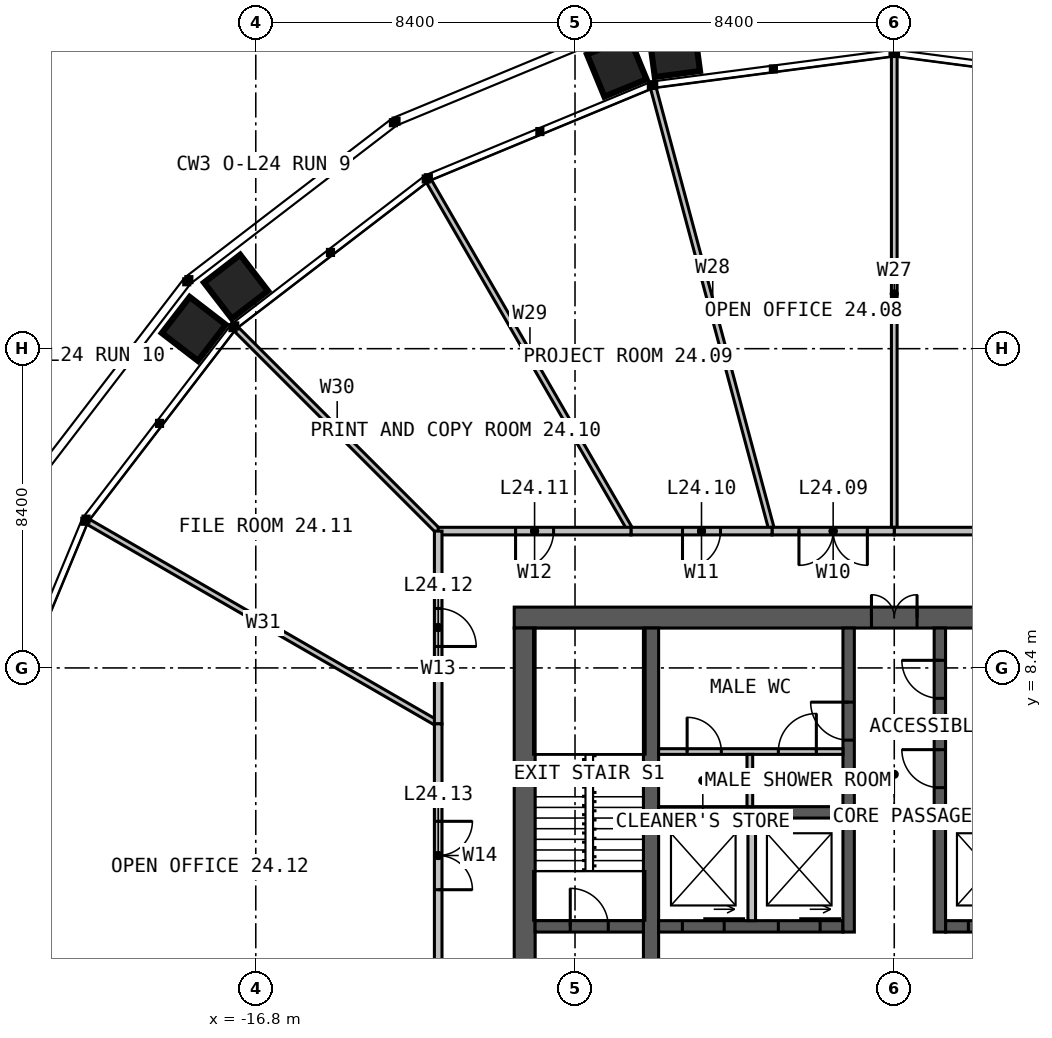
"""IFC4 building model, lengths in metres.
Left out: names, types, materials, properties, quantities, classifications, styles, units other than length and angle.
Written with IfcOpenShell. Run it as: python <this file> out.ifc"""

import sys

from ifc_helpers import new_model, si_unit, direction, frame, frame_2d, origin, place, context, subcontext, project, spatial, rectangle, extrude, element, fill, save


model = new_model("IFC4")
c1 = context("Model", 3, precision=1e-05, world=origin(), true_north=direction((0.0, 1.0)))
c2 = subcontext(c1, "Body", "Model", "MODEL_VIEW")
j1 = project(units=[si_unit("LENGTHUNIT", "METRE"), si_unit("PLANEANGLEUNIT", "RADIAN")], contexts=[c1])
p1 = place(None, origin())
s1 = spatial("IfcSite", under=j1, at=p1, CompositionType="ELEMENT")
p2 = place(p1, origin())
s2 = spatial("IfcBuilding", under=s1, at=p2, CompositionType="ELEMENT")
p3 = place(p2, frame((0.0, 0.0, 102.0)))
s3 = spatial("IfcBuildingStorey", under=s2, at=p3, CompositionType="ELEMENT", Elevation=102.0)
p4 = place(p3, frame((-10.0, 9.725, 0.0), z_axis=(0.0, 0.0, 1.0), x_axis=(1.0, 0.0, 0.0)))
e1 = element("IfcWall", 1, at=p4, inside=s3, PredefinedType="SOLIDWALL", context=c2, shape_type="SweptSolid", body=[
    extrude(rectangle(XDim=20.0, YDim=0.55, at=frame_2d((10.0, 0.0))), origin(), (0.0, 0.0, 1.0), 4.0),
])
p5 = place(p4, frame((9.4, 0.0, 0.0)))
e2 = element("IfcOpeningElement", 2, at=p5, cuts=e1, PredefinedType="OPENING", context=c2, shape_type="SweptSolid", body=[
    extrude(rectangle(XDim=1.2, YDim=2.2, at=frame_2d((0.6, 1.1))), frame((0.0, 0.285, 0.0), z_axis=(0.0, -1.0, 0.0), x_axis=(1.0, 0.0, 0.0)), (0.0, 0.0, 1.0), 0.57),
])
p6 = place(p3, frame((-9.725, 9.45, 0.0), z_axis=(0.0, 0.0, 1.0), x_axis=(0.0, -1.0, 0.0)))
e3 = element("IfcWall", 3, at=p6, inside=s3, PredefinedType="SOLIDWALL", context=c2, shape_type="SweptSolid", body=[
    extrude(rectangle(XDim=18.9, YDim=0.55, at=frame_2d((9.45, 0.0))), origin(), (0.0, 0.0, 1.0), 4.0),
])
p7 = place(p3, frame((-6.4, -9.45, 0.0), z_axis=(0.0, 0.0, 1.0), x_axis=(0.0, 1.0, 0.0)))
e4 = element("IfcWall", 4, at=p7, inside=s3, PredefinedType="SOLIDWALL", context=c2, shape_type="SweptSolid", body=[
    extrude(rectangle(XDim=18.9, YDim=0.4, at=frame_2d((9.45, 0.0))), origin(), (0.0, 0.0, 1.0), 4.0),
])
p8 = place(p7, frame((8.95, 0.0, 0.0)))
e5 = element("IfcOpeningElement", 5, at=p8, cuts=e4, PredefinedType="OPENING", context=c2, shape_type="SweptSolid", body=[
    extrude(rectangle(XDim=1.0, YDim=2.2, at=frame_2d((0.5, 1.1))), frame((0.0, 0.21, 0.0), z_axis=(0.0, -1.0, 0.0), x_axis=(1.0, 0.0, 0.0)), (0.0, 0.0, 1.0), 0.42),
])
p9 = place(p3, frame((-6.2, 1.6, 0.0), z_axis=(0.0, 0.0, 1.0), x_axis=(1.0, 0.0, 0.0)))
e6 = element("IfcWall", 6, at=p9, inside=s3, PredefinedType="SOLIDWALL", context=c2, shape_type="SweptSolid", body=[
    extrude(rectangle(XDim=4.85, YDim=0.3, at=frame_2d((2.425, 0.0))), origin(), (0.0, 0.0, 1.0), 4.0),
])
p10 = place(p9, frame((0.625, 0.0, 0.0)))
e7 = element("IfcOpeningElement", 7, at=p10, cuts=e6, PredefinedType="OPENING", context=c2, shape_type="SweptSolid", body=[
    extrude(rectangle(XDim=1.1, YDim=2.2, at=frame_2d((0.55, 1.1))), frame((0.0, 0.16, 0.0), z_axis=(0.0, -1.0, 0.0), x_axis=(1.0, 0.0, 0.0)), (0.0, 0.0, 1.0), 0.32),
])
p11 = place(p9, frame((3.15, 0.0, 0.0)))
e8 = element("IfcOpeningElement", 8, at=p11, cuts=e6, PredefinedType="OPENING", context=c2, shape_type="SweptSolid", body=[
    extrude(rectangle(XDim=1.1, YDim=2.2, at=frame_2d((0.55, 1.1))), frame((0.0, 0.16, 0.0), z_axis=(0.0, -1.0, 0.0), x_axis=(1.0, 0.0, 0.0)), (0.0, 0.0, 1.0), 0.32),
])
p12 = place(p3, frame((1.35, 1.6, 0.0), z_axis=(0.0, 0.0, 1.0), x_axis=(1.0, 0.0, 0.0)))
e9 = element("IfcWall", 9, at=p12, inside=s3, PredefinedType="SOLIDWALL", context=c2, shape_type="SweptSolid", body=[
    extrude(rectangle(XDim=4.85, YDim=0.3, at=frame_2d((2.425, 0.0))), origin(), (0.0, 0.0, 1.0), 4.0),
])
p13 = place(p12, frame((0.6, 0.0, 0.0)))
e10 = element("IfcOpeningElement", 10, at=p13, cuts=e9, PredefinedType="OPENING", context=c2, shape_type="SweptSolid", body=[
    extrude(rectangle(XDim=1.1, YDim=2.2, at=frame_2d((0.55, 1.1))), frame((0.0, 0.16, 0.0), z_axis=(0.0, -1.0, 0.0), x_axis=(1.0, 0.0, 0.0)), (0.0, 0.0, 1.0), 0.32),
])
p14 = place(p12, frame((3.125, 0.0, 0.0)))
e11 = element("IfcOpeningElement", 11, at=p14, cuts=e9, PredefinedType="OPENING", context=c2, shape_type="SweptSolid", body=[
    extrude(rectangle(XDim=1.1, YDim=2.2, at=frame_2d((0.55, 1.1))), frame((0.0, 0.16, 0.0), z_axis=(0.0, -1.0, 0.0), x_axis=(1.0, 0.0, 0.0)), (0.0, 0.0, 1.0), 0.32),
])
for number, where, z_axis, x_axis in (
    (12, (-6.2, 4.6, 0.0), (0.0, 0.0, 1.0), (1.0, 0.0, 0.0)),
    (13, (1.35, 4.6, 0.0), (0.0, 0.0, 1.0), (1.0, 0.0, 0.0)),
):
    element("IfcWall", number, at=place(p3, frame(where, z_axis=z_axis, x_axis=x_axis)), inside=s3, PredefinedType="SOLIDWALL", context=c2, shape_type="SweptSolid", body=[
        extrude(rectangle(XDim=4.85, YDim=0.3, at=frame_2d((2.425, 0.0))), origin(), (0.0, 0.0, 1.0), 4.0),
    ])
p15 = place(p3, frame((-1.2, 1.45, 0.0), z_axis=(0.0, 0.0, 1.0), x_axis=(0.0, 1.0, 0.0)))
e14 = element("IfcWall", 14, at=p15, inside=s3, PredefinedType="SOLIDWALL", context=c2, shape_type="SweptSolid", body=[
    extrude(rectangle(XDim=8.0, YDim=0.3, at=frame_2d((4.0, 0.0))), origin(), (0.0, 0.0, 1.0), 4.0),
])
p16 = place(p15, frame((5.05, 0.0, 0.0)))
e15 = element("IfcOpeningElement", 15, at=p16, cuts=e14, PredefinedType="OPENING", context=c2, shape_type="SweptSolid", body=[
    extrude(rectangle(XDim=1.0, YDim=2.2, at=frame_2d((0.5, 1.1))), frame((0.0, 0.16, 0.0), z_axis=(0.0, -1.0, 0.0), x_axis=(1.0, 0.0, 0.0)), (0.0, 0.0, 1.0), 0.32),
])
p17 = place(p3, frame((1.2, 1.45, 0.0), z_axis=(0.0, 0.0, 1.0), x_axis=(0.0, 1.0, 0.0)))
e16 = element("IfcWall", 16, at=p17, inside=s3, PredefinedType="SOLIDWALL", context=c2, shape_type="SweptSolid", body=[
    extrude(rectangle(XDim=8.0, YDim=0.3, at=frame_2d((4.0, 0.0))), origin(), (0.0, 0.0, 1.0), 4.0),
])
p18 = place(p17, frame((3.8, 0.0, 0.0)))
e17 = element("IfcOpeningElement", 17, at=p18, cuts=e16, PredefinedType="OPENING", context=c2, shape_type="SweptSolid", body=[
    extrude(rectangle(XDim=1.0, YDim=2.2, at=frame_2d((0.5, 1.1))), frame((0.0, 0.16, 0.0), z_axis=(0.0, -1.0, 0.0), x_axis=(1.0, 0.0, 0.0)), (0.0, 0.0, 1.0), 0.32),
])
p19 = place(p17, frame((6.15, 0.0, 0.0)))
e18 = element("IfcOpeningElement", 18, at=p19, cuts=e16, PredefinedType="OPENING", context=c2, shape_type="SweptSolid", body=[
    extrude(rectangle(XDim=1.0, YDim=2.2, at=frame_2d((0.5, 1.1))), frame((0.0, 0.16, 0.0), z_axis=(0.0, -1.0, 0.0), x_axis=(1.0, 0.0, 0.0)), (0.0, 0.0, 1.0), 0.32),
])
p20 = place(p3, frame((-9.45, 1.6, 0.0), z_axis=(0.0, 0.0, 1.0), x_axis=(1.0, 0.0, 0.0)))
e19 = element("IfcWall", 19, at=p20, inside=s3, PredefinedType="SOLIDWALL", context=c2, shape_type="SweptSolid", body=[
    extrude(rectangle(XDim=2.85, YDim=0.3, at=frame_2d((1.425, 0.0))), origin(), (0.0, 0.0, 1.0), 4.0),
])
p21 = place(p20, frame((0.925, 0.0, 0.0)))
e20 = element("IfcOpeningElement", 20, at=p21, cuts=e19, PredefinedType="OPENING", context=c2, shape_type="SweptSolid", body=[
    extrude(rectangle(XDim=1.0, YDim=2.2, at=frame_2d((0.5, 1.1))), frame((0.0, 0.16, 0.0), z_axis=(0.0, -1.0, 0.0), x_axis=(1.0, 0.0, 0.0)), (0.0, 0.0, 1.0), 0.32),
])
p22 = place(p3, frame((-3.75, 1.75, 0.0), z_axis=(0.0, 0.0, 1.0), x_axis=(0.0, 1.0, 0.0)))
e21 = element("IfcWall", 21, at=p22, inside=s3, PredefinedType="SOLIDWALL", context=c2, shape_type="SweptSolid", body=[
    extrude(rectangle(XDim=2.7, YDim=0.2, at=frame_2d((1.35, 0.0))), origin(), (0.0, 0.0, 1.0), 3.75),
])
p23 = place(p3, frame((1.35, 6.8, 0.0), z_axis=(0.0, 0.0, 1.0), x_axis=(1.0, 0.0, 0.0)))
e22 = element("IfcWall", 22, at=p23, inside=s3, PredefinedType="PARTITIONING", context=c2, shape_type="SweptSolid", body=[
    extrude(rectangle(XDim=4.85, YDim=0.15, at=frame_2d((2.425, 0.0))), origin(), (0.0, 0.0, 1.0), 3.75),
])
p24 = place(p3, frame((-6.2, 6.2, 0.0), z_axis=(0.0, 0.0, 1.0), x_axis=(1.0, 0.0, 0.0)))
e23 = element("IfcWall", 23, at=p24, inside=s3, PredefinedType="PARTITIONING", context=c2, shape_type="SweptSolid", body=[
    extrude(rectangle(XDim=4.85, YDim=0.15, at=frame_2d((2.425, 0.0))), origin(), (0.0, 0.0, 1.0), 3.75),
])
p25 = place(p24, frame((3.15, 0.0, 0.0)))
e24 = element("IfcOpeningElement", 24, at=p25, cuts=e23, PredefinedType="OPENING", context=c2, shape_type="SweptSolid", body=[
    extrude(rectangle(XDim=1.0, YDim=2.2, at=frame_2d((0.5, 1.1))), frame((0.0, 0.085, 0.0), z_axis=(0.0, -1.0, 0.0), x_axis=(1.0, 0.0, 0.0)), (0.0, 0.0, 1.0), 0.17),
])
p26 = place(p24, frame((0.75, 0.0, 0.0)))
e25 = element("IfcOpeningElement", 25, at=p26, cuts=e23, PredefinedType="OPENING", context=c2, shape_type="SweptSolid", body=[
    extrude(rectangle(XDim=0.9, YDim=2.2, at=frame_2d((0.45, 1.1))), frame((0.0, 0.085, 0.0), z_axis=(0.0, -1.0, 0.0), x_axis=(1.0, 0.0, 0.0)), (0.0, 0.0, 1.0), 0.17),
])
p27 = place(p3, frame((-3.8, 4.75, 0.0), z_axis=(0.0, 0.0, 1.0), x_axis=(0.0, 1.0, 0.0)))
e26 = element("IfcWall", 26, at=p27, inside=s3, PredefinedType="PARTITIONING", context=c2, shape_type="SweptSolid", body=[
    extrude(rectangle(XDim=1.375, YDim=0.15, at=frame_2d((0.688, 0.0))), origin(), (0.0, 0.0, 1.0), 3.75),
])
p28 = place(p3, frame((0.0, 12.0, 0.0), z_axis=(0.0, 0.0, 1.0), x_axis=(0.0, 1.0, 0.0)))
e27 = element("IfcWall", 27, at=p28, inside=s3, PredefinedType="PARTITIONING", context=c2, shape_type="SweptSolid", body=[
    extrude(rectangle(XDim=12.487, YDim=0.15, at=frame_2d((6.244, 0.0))), origin(), (0.0, 0.0, 1.0), 2.79),
])
p29 = place(p3, frame((-3.215, 12.0, 0.0), z_axis=(0.0, 0.0, 1.0), x_axis=(-0.258814986396, 0.965926913807, 0.0)))
e28 = element("IfcWall", 28, at=p29, inside=s3, PredefinedType="PARTITIONING", context=c2, shape_type="SweptSolid", body=[
    extrude(rectangle(XDim=12.064, YDim=0.15, at=frame_2d((6.032, 0.0))), origin(), (0.0, 0.0, 1.0), 2.79),
])
p30 = place(p3, frame((-6.928, 12.0, 0.0), z_axis=(0.0, 0.0, 1.0), x_axis=(-0.500002090115, 0.866024197053, 0.0)))
e29 = element("IfcWall", 29, at=p30, inside=s3, PredefinedType="PARTITIONING", context=c2, shape_type="SweptSolid", body=[
    extrude(rectangle(XDim=10.631, YDim=0.15, at=frame_2d((5.315, 0.0))), origin(), (0.0, 0.0, 1.0), 2.79),
])
p31 = place(p3, frame((-12.0, 12.0, 0.0), z_axis=(0.0, 0.0, 1.0), x_axis=(-0.707106781187, 0.707106781187, 0.0)))
e30 = element("IfcWall", 30, at=p31, inside=s3, PredefinedType="PARTITIONING", context=c2, shape_type="SweptSolid", body=[
    extrude(rectangle(XDim=7.517, YDim=0.15, at=frame_2d((3.758, 0.0))), origin(), (0.0, 0.0, 1.0), 2.79),
])
p32 = place(p3, frame((-12.0, 6.928, 0.0), z_axis=(0.0, 0.0, 1.0), x_axis=(-0.866024197053, 0.500002090115, 0.0)))
e31 = element("IfcWall", 31, at=p32, inside=s3, PredefinedType="PARTITIONING", context=c2, shape_type="SweptSolid", body=[
    extrude(rectangle(XDim=10.631, YDim=0.15, at=frame_2d((5.315, 0.0))), origin(), (0.0, 0.0, 1.0), 2.79),
])
p33 = place(p3, frame((6.928, 12.0, 0.0), z_axis=(0.0, 0.0, 1.0), x_axis=(-1.0, 0.0, 0.0)))
e32 = element("IfcWall", 32, at=p33, inside=s3, PredefinedType="PARTITIONING", context=c2, shape_type="SweptSolid", body=[
    extrude(rectangle(XDim=6.928, YDim=0.2, at=frame_2d((3.464, 0.0))), origin(), (0.0, 0.0, 1.0), 3.8),
])
p34 = place(p33, frame((2.564, 0.0, 0.0)))
e33 = element("IfcOpeningElement", 33, at=p34, cuts=e32, PredefinedType="OPENING", context=c2, shape_type="SweptSolid", body=[
    extrude(rectangle(XDim=1.8, YDim=2.2, at=frame_2d((0.9, 1.1))), frame((0.0, 0.11, 0.0), z_axis=(0.0, -1.0, 0.0), x_axis=(1.0, 0.0, 0.0)), (0.0, 0.0, 1.0), 0.22),
])
p35 = place(p3, frame((0.0, 12.0, 0.0), z_axis=(0.0, 0.0, 1.0), x_axis=(-1.0, 0.0, 0.0)))
e34 = element("IfcWall", 34, at=p35, inside=s3, PredefinedType="PARTITIONING", context=c2, shape_type="SweptSolid", body=[
    extrude(rectangle(XDim=3.215, YDim=0.2, at=frame_2d((1.608, 0.0))), origin(), (0.0, 0.0, 1.0), 3.8),
])
p36 = place(p35, frame((0.708, 0.0, 0.0)))
e35 = element("IfcOpeningElement", 35, at=p36, cuts=e34, PredefinedType="OPENING", context=c2, shape_type="SweptSolid", body=[
    extrude(rectangle(XDim=1.8, YDim=2.2, at=frame_2d((0.9, 1.1))), frame((0.0, 0.11, 0.0), z_axis=(0.0, -1.0, 0.0), x_axis=(1.0, 0.0, 0.0)), (0.0, 0.0, 1.0), 0.22),
])
p37 = place(p3, frame((-3.215, 12.0, 0.0), z_axis=(0.0, 0.0, 1.0), x_axis=(-1.0, 0.0, 0.0)))
e36 = element("IfcWall", 36, at=p37, inside=s3, PredefinedType="PARTITIONING", context=c2, shape_type="SweptSolid", body=[
    extrude(rectangle(XDim=3.713, YDim=0.2, at=frame_2d((1.856, 0.0))), origin(), (0.0, 0.0, 1.0), 3.8),
])
p38 = place(p37, frame((1.356, 0.0, 0.0)))
e37 = element("IfcOpeningElement", 37, at=p38, cuts=e36, PredefinedType="OPENING", context=c2, shape_type="SweptSolid", body=[
    extrude(rectangle(XDim=1.0, YDim=2.2, at=frame_2d((0.5, 1.1))), frame((0.0, 0.11, 0.0), z_axis=(0.0, -1.0, 0.0), x_axis=(1.0, 0.0, 0.0)), (0.0, 0.0, 1.0), 0.22),
])
p39 = place(p3, frame((-6.928, 12.0, 0.0), z_axis=(0.0, 0.0, 1.0), x_axis=(-1.0, 0.0, 0.0)))
e38 = element("IfcWall", 38, at=p39, inside=s3, PredefinedType="PARTITIONING", context=c2, shape_type="SweptSolid", body=[
    extrude(rectangle(XDim=5.072, YDim=0.2, at=frame_2d((2.536, 0.0))), origin(), (0.0, 0.0, 1.0), 3.8),
])
p40 = place(p39, frame((2.036, 0.0, 0.0)))
e39 = element("IfcOpeningElement", 39, at=p40, cuts=e38, PredefinedType="OPENING", context=c2, shape_type="SweptSolid", body=[
    extrude(rectangle(XDim=1.0, YDim=2.2, at=frame_2d((0.5, 1.1))), frame((0.0, 0.11, 0.0), z_axis=(0.0, -1.0, 0.0), x_axis=(1.0, 0.0, 0.0)), (0.0, 0.0, 1.0), 0.22),
])
p41 = place(p3, frame((-12.0, 12.0, 0.0), z_axis=(0.0, 0.0, 1.0), x_axis=(0.0, -1.0, 0.0)))
e40 = element("IfcWall", 40, at=p41, inside=s3, PredefinedType="PARTITIONING", context=c2, shape_type="SweptSolid", body=[
    extrude(rectangle(XDim=5.072, YDim=0.2, at=frame_2d((2.536, 0.0))), origin(), (0.0, 0.0, 1.0), 3.8),
])
p42 = place(p41, frame((2.036, 0.0, 0.0)))
e41 = element("IfcOpeningElement", 41, at=p42, cuts=e40, PredefinedType="OPENING", context=c2, shape_type="SweptSolid", body=[
    extrude(rectangle(XDim=1.0, YDim=2.2, at=frame_2d((0.5, 1.1))), frame((0.0, 0.11, 0.0), z_axis=(0.0, -1.0, 0.0), x_axis=(1.0, 0.0, 0.0)), (0.0, 0.0, 1.0), 0.22),
])
p43 = place(p3, frame((-12.0, 6.928, 0.0), z_axis=(0.0, 0.0, 1.0), x_axis=(0.0, -1.0, 0.0)))
e42 = element("IfcWall", 42, at=p43, inside=s3, PredefinedType="PARTITIONING", context=c2, shape_type="SweptSolid", body=[
    extrude(rectangle(XDim=6.928, YDim=0.2, at=frame_2d((3.464, 0.0))), origin(), (0.0, 0.0, 1.0), 3.8),
])
p44 = place(p43, frame((2.564, 0.0, 0.0)))
e43 = element("IfcOpeningElement", 43, at=p44, cuts=e42, PredefinedType="OPENING", context=c2, shape_type="SweptSolid", body=[
    extrude(rectangle(XDim=1.8, YDim=2.2, at=frame_2d((0.9, 1.1))), frame((0.0, 0.11, 0.0), z_axis=(0.0, -1.0, 0.0), x_axis=(1.0, 0.0, 0.0)), (0.0, 0.0, 1.0), 0.22),
])
p45 = place(p5, origin())
e44 = element("IfcDoor", 44, at=p45, inside=s3, OperationType="DOUBLE_DOOR_SINGLE_SWING", PredefinedType="DOOR", context=c2, shape_type="SweptSolid", body=[
    extrude(rectangle(XDim=1.2, YDim=2.2, at=frame_2d((0.6, 1.1))), frame((0.0, 0.025, 0.0), z_axis=(0.0, -1.0, 0.0), x_axis=(1.0, 0.0, 0.0)), (0.0, 0.0, 1.0), 0.05),
])
fill(e2, e44)
p46 = place(p21, origin())
e45 = element("IfcDoor", 45, at=p46, inside=s3, OperationType="SINGLE_SWING_LEFT", PredefinedType="DOOR", context=c2, shape_type="SweptSolid", body=[
    extrude(rectangle(XDim=1.0, YDim=2.2, at=frame_2d((0.5, 1.1))), frame((0.0, 0.025, 0.0), z_axis=(0.0, -1.0, 0.0), x_axis=(1.0, 0.0, 0.0)), (0.0, 0.0, 1.0), 0.05),
])
fill(e20, e45)
p47 = place(p16, origin())
e46 = element("IfcDoor", 46, at=p47, inside=s3, OperationType="SINGLE_SWING_RIGHT", PredefinedType="DOOR", context=c2, shape_type="SweptSolid", body=[
    extrude(rectangle(XDim=1.0, YDim=2.2, at=frame_2d((0.5, 1.1))), frame((0.0, 0.025, 0.0), z_axis=(0.0, -1.0, 0.0), x_axis=(1.0, 0.0, 0.0)), (0.0, 0.0, 1.0), 0.05),
])
fill(e15, e46)
p48 = place(p18, origin())
e47 = element("IfcDoor", 47, at=p48, inside=s3, OperationType="SINGLE_SWING_RIGHT", PredefinedType="DOOR", context=c2, shape_type="SweptSolid", body=[
    extrude(rectangle(XDim=1.0, YDim=2.2, at=frame_2d((0.5, 1.1))), frame((0.0, 0.025, 0.0), z_axis=(0.0, -1.0, 0.0), x_axis=(1.0, 0.0, 0.0)), (0.0, 0.0, 1.0), 0.05),
])
fill(e17, e47)
p49 = place(p19, origin())
e48 = element("IfcDoor", 48, at=p49, inside=s3, OperationType="SINGLE_SWING_RIGHT", PredefinedType="DOOR", context=c2, shape_type="SweptSolid", body=[
    extrude(rectangle(XDim=1.0, YDim=2.2, at=frame_2d((0.5, 1.1))), frame((0.0, 0.025, 0.0), z_axis=(0.0, -1.0, 0.0), x_axis=(1.0, 0.0, 0.0)), (0.0, 0.0, 1.0), 0.05),
])
fill(e18, e48)
p50 = place(p25, origin())
e49 = element("IfcDoor", 49, at=p50, inside=s3, OperationType="SINGLE_SWING_RIGHT", PredefinedType="DOOR", context=c2, shape_type="SweptSolid", body=[
    extrude(rectangle(XDim=1.0, YDim=2.2, at=frame_2d((0.5, 1.1))), frame((0.0, 0.025, 0.0), z_axis=(0.0, -1.0, 0.0), x_axis=(1.0, 0.0, 0.0)), (0.0, 0.0, 1.0), 0.05),
])
fill(e24, e49)
p51 = place(p26, origin())
e50 = element("IfcDoor", 50, at=p51, inside=s3, OperationType="SINGLE_SWING_LEFT", PredefinedType="DOOR", context=c2, shape_type="SweptSolid", body=[
    extrude(rectangle(XDim=0.9, YDim=2.2, at=frame_2d((0.45, 1.1))), frame((0.0, 0.025, 0.0), z_axis=(0.0, -1.0, 0.0), x_axis=(1.0, 0.0, 0.0)), (0.0, 0.0, 1.0), 0.05),
])
fill(e25, e50)
p52 = place(p10, origin())
e51 = element("IfcDoor", 51, at=p52, inside=s3, OperationType="SLIDING_TO_LEFT", PredefinedType="DOOR", context=c2, shape_type="SweptSolid", body=[
    extrude(rectangle(XDim=1.1, YDim=2.2, at=frame_2d((0.55, 1.1))), frame((0.0, 0.025, 0.0), z_axis=(0.0, -1.0, 0.0), x_axis=(1.0, 0.0, 0.0)), (0.0, 0.0, 1.0), 0.05),
])
fill(e7, e51)
p53 = place(p11, origin())
e52 = element("IfcDoor", 52, at=p53, inside=s3, OperationType="SLIDING_TO_LEFT", PredefinedType="DOOR", context=c2, shape_type="SweptSolid", body=[
    extrude(rectangle(XDim=1.1, YDim=2.2, at=frame_2d((0.55, 1.1))), frame((0.0, 0.025, 0.0), z_axis=(0.0, -1.0, 0.0), x_axis=(1.0, 0.0, 0.0)), (0.0, 0.0, 1.0), 0.05),
])
fill(e8, e52)
p54 = place(p13, origin())
e53 = element("IfcDoor", 53, at=p54, inside=s3, OperationType="SLIDING_TO_LEFT", PredefinedType="DOOR", context=c2, shape_type="SweptSolid", body=[
    extrude(rectangle(XDim=1.1, YDim=2.2, at=frame_2d((0.55, 1.1))), frame((0.0, 0.025, 0.0), z_axis=(0.0, -1.0, 0.0), x_axis=(1.0, 0.0, 0.0)), (0.0, 0.0, 1.0), 0.05),
])
fill(e10, e53)
p55 = place(p36, origin())
e54 = element("IfcDoor", 54, at=p55, inside=s3, OperationType="DOUBLE_DOOR_SINGLE_SWING", PredefinedType="DOOR", context=c2, shape_type="SweptSolid", body=[
    extrude(rectangle(XDim=1.8, YDim=2.2, at=frame_2d((0.9, 1.1))), frame((0.0, 0.025, 0.0), z_axis=(0.0, -1.0, 0.0), x_axis=(1.0, 0.0, 0.0)), (0.0, 0.0, 1.0), 0.05),
])
fill(e35, e54)
p56 = place(p38, origin())
e55 = element("IfcDoor", 55, at=p56, inside=s3, OperationType="SINGLE_SWING_RIGHT", PredefinedType="DOOR", context=c2, shape_type="SweptSolid", body=[
    extrude(rectangle(XDim=1.0, YDim=2.2, at=frame_2d((0.5, 1.1))), frame((0.0, 0.025, 0.0), z_axis=(0.0, -1.0, 0.0), x_axis=(1.0, 0.0, 0.0)), (0.0, 0.0, 1.0), 0.05),
])
fill(e37, e55)
p57 = place(p40, origin())
e56 = element("IfcDoor", 56, at=p57, inside=s3, OperationType="SINGLE_SWING_RIGHT", PredefinedType="DOOR", context=c2, shape_type="SweptSolid", body=[
    extrude(rectangle(XDim=1.0, YDim=2.2, at=frame_2d((0.5, 1.1))), frame((0.0, 0.025, 0.0), z_axis=(0.0, -1.0, 0.0), x_axis=(1.0, 0.0, 0.0)), (0.0, 0.0, 1.0), 0.05),
])
fill(e39, e56)
p58 = place(p42, origin())
e57 = element("IfcDoor", 57, at=p58, inside=s3, OperationType="SINGLE_SWING_RIGHT", PredefinedType="DOOR", context=c2, shape_type="SweptSolid", body=[
    extrude(rectangle(XDim=1.0, YDim=2.2, at=frame_2d((0.5, 1.1))), frame((0.0, 0.025, 0.0), z_axis=(0.0, -1.0, 0.0), x_axis=(1.0, 0.0, 0.0)), (0.0, 0.0, 1.0), 0.05),
])
fill(e41, e57)
p59 = place(p44, origin())
e58 = element("IfcDoor", 58, at=p59, inside=s3, OperationType="DOUBLE_DOOR_SINGLE_SWING", PredefinedType="DOOR", context=c2, shape_type="SweptSolid", body=[
    extrude(rectangle(XDim=1.8, YDim=2.2, at=frame_2d((0.9, 1.1))), frame((0.0, 0.025, 0.0), z_axis=(0.0, -1.0, 0.0), x_axis=(1.0, 0.0, 0.0)), (0.0, 0.0, 1.0), 0.05),
])
fill(e43, e58)
save(model, sys.argv[1])
